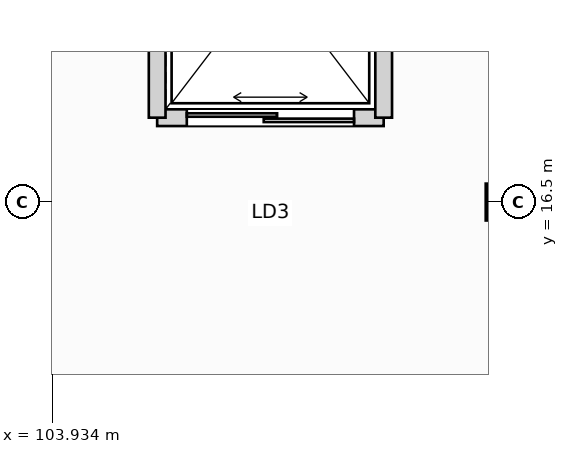
"""IFC4 building model, lengths in metres.
Left out: names, types, materials, properties, quantities, classifications, styles, units other than length and angle.
Written with IfcOpenShell. Run it as: python <this file> out.ifc"""

import sys

from ifc_helpers import new_model, si_unit, direction, frame, frame_2d, origin, origin_2d, place, context, subcontext, project, spatial, rectangle, i_section, extrude, element, fill, save


model = new_model("IFC4")
c1 = context("Model", 3, precision=1e-05, world=origin(), true_north=direction((0.0, 1.0)))
c2 = subcontext(c1, "Body", "Model", "MODEL_VIEW")
j1 = project(units=[si_unit("LENGTHUNIT", "METRE"), si_unit("PLANEANGLEUNIT", "RADIAN")], contexts=[c1])
p1 = place(None, origin())
s1 = spatial("IfcSite", under=j1, at=p1, CompositionType="ELEMENT")
p2 = place(p1, origin())
s2 = spatial("IfcBuilding", under=s1, at=p2, CompositionType="ELEMENT")
p3 = place(p2, frame((0.0, 0.0, 6.0)))
s3 = spatial("IfcBuildingStorey", under=s2, at=p3, CompositionType="ELEMENT", Elevation=6.0)
p4 = place(p3, frame((109.8, 16.5, 0.0), z_axis=(0.0, 0.0, 1.0), x_axis=(1.0, 0.0, 0.0)))
e1 = element("IfcColumn", 1, at=p4, inside=s3, PredefinedType="COLUMN", context=c2, shape_type="SweptSolid", body=[
    extrude(i_section(OverallWidth=0.3, OverallDepth=0.45, WebThickness=0.014, FlangeThickness=0.026, at=origin_2d()), origin(), (0.0, 0.0, 1.0), 5.4),
])
p5 = place(p3, frame((105.31, 17.61, 0.0), z_axis=(0.0, 0.0, 1.0), x_axis=(1.0, 0.0, 0.0)))
e2 = element("IfcWall", 2, at=p5, inside=s3, PredefinedType="PARTITIONING", context=c2, shape_type="SweptSolid", body=[
    extrude(rectangle(XDim=2.98, YDim=0.22, at=frame_2d((1.49, 0.0))), origin(), (0.0, 0.0, 1.0), 5.015),
])
p6 = place(p5, frame((0.39, 0.0, 0.0)))
e3 = element("IfcOpeningElement", 3, at=p6, cuts=e2, PredefinedType="OPENING", context=c2, shape_type="SweptSolid", body=[
    extrude(rectangle(XDim=2.2, YDim=2.5, at=frame_2d((1.1, 1.25))), frame((0.0, 0.12, 0.0), z_axis=(0.0, -1.0, 0.0), x_axis=(1.0, 0.0, 0.0)), (0.0, 0.0, 1.0), 0.24),
])
for number, where, z_axis, x_axis in (
    (4, (105.31, 17.61, 0.0), (0.0, 0.0, 1.0), (0.0, 1.0, 0.0)),
    (5, (108.29, 17.61, 0.0), (0.0, 0.0, 1.0), (0.0, 1.0, 0.0)),
):
    element("IfcWall", number, at=place(p3, frame(where, z_axis=z_axis, x_axis=x_axis)), inside=s3, PredefinedType="PARTITIONING", context=c2, shape_type="SweptSolid", body=[
        extrude(rectangle(XDim=3.78, YDim=0.22, at=frame_2d((1.89, 0.0))), origin(), (0.0, 0.0, 1.0), 5.015),
    ])
p7 = place(p6, origin())
e6 = element("IfcDoor", 6, at=p7, inside=s3, OperationType="DOUBLE_DOOR_SLIDING", PredefinedType="DOOR", context=c2, shape_type="SweptSolid", body=[
    extrude(rectangle(XDim=2.2, YDim=2.5, at=frame_2d((1.1, 1.25))), frame((0.0, 0.025, 0.0), z_axis=(0.0, -1.0, 0.0), x_axis=(1.0, 0.0, 0.0)), (0.0, 0.0, 1.0), 0.05),
])
fill(e3, e6)
save(model, sys.argv[1])
